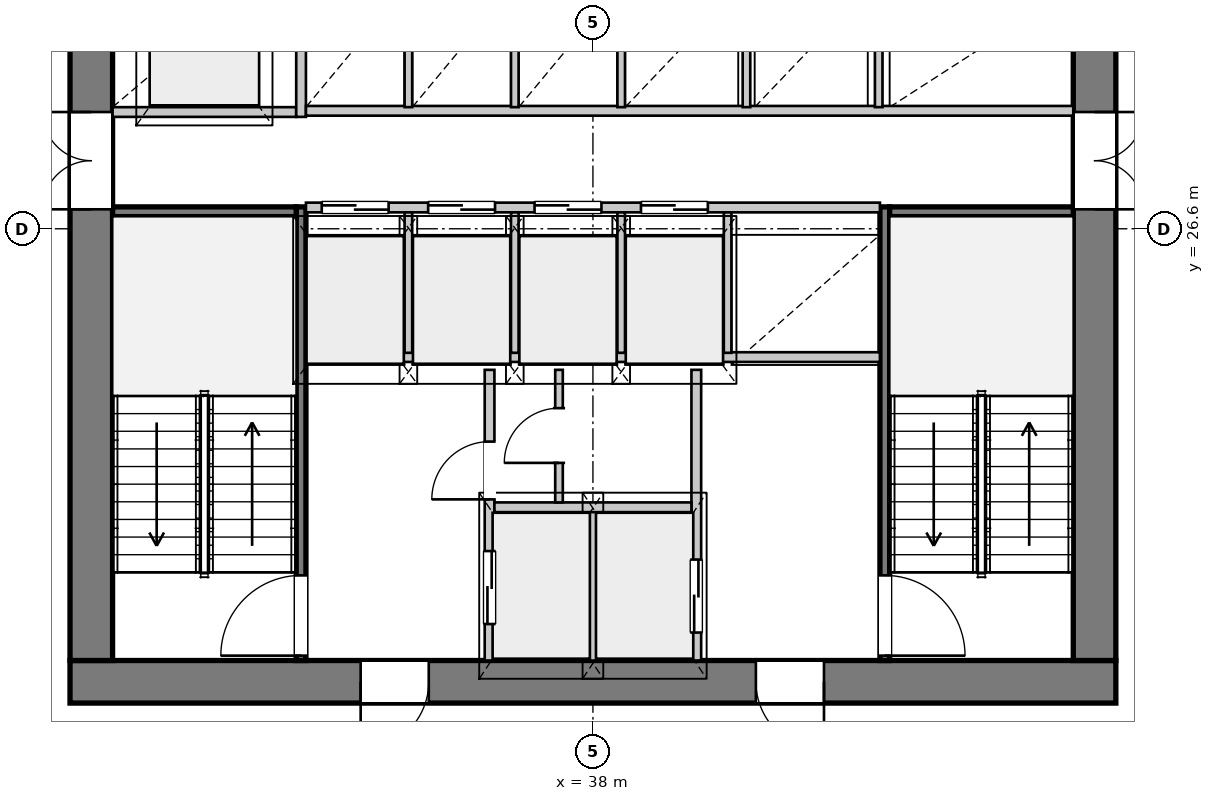
"""IFC4 building model, lengths in metres.
Left out: names, types, materials, properties, quantities, classifications, styles, units other than length and angle.
Written with IfcOpenShell. Run it as: python <this file> out.ifc"""

import sys

from ifc_helpers import new_model, si_unit, direction, frame, frame_2d, origin, place, context, subcontext, project, spatial, rectangle, extrude, source, transform, mapped, element, fill, save


model = new_model("IFC4")
c1 = context("Model", 3, precision=1e-05, world=origin(), true_north=direction((0.0, 1.0)))
c2 = subcontext(c1, "Body", "Model", "MODEL_VIEW")
j1 = project(units=[si_unit("LENGTHUNIT", "METRE"), si_unit("PLANEANGLEUNIT", "RADIAN")], contexts=[c1])
p1 = place(None, origin())
s1 = spatial("IfcSite", under=j1, at=p1, CompositionType="ELEMENT")
p2 = place(p1, origin())
s2 = spatial("IfcBuilding", under=s1, at=p2, CompositionType="ELEMENT")
p3 = place(p2, frame((0.0, 0.0, 119.9)))
s3 = spatial("IfcBuildingStorey", under=s2, at=p3, CompositionType="ELEMENT", Elevation=119.9)
p4 = place(p3, frame((46.6, 19.15, 0.0), z_axis=(0.0, 0.0, 1.0), x_axis=(-1.0, 0.0, 0.0)))
e1 = element("IfcWall", 1, at=p4, inside=s3, PredefinedType="SHEAR", context=c2, shape_type="SweptSolid", body=[
    extrude(rectangle(XDim=17.2, YDim=0.7, at=frame_2d((8.6, 0.0))), origin(), (0.0, 0.0, 1.0), 3.3),
])
p5 = place(p4, frame((4.8, 0.0, 0.0)))
e2 = element("IfcOpeningElement", 2, at=p5, cuts=e1, PredefinedType="OPENING", context=c2, shape_type="SweptSolid", body=[
    extrude(rectangle(XDim=1.12, YDim=2.25, at=frame_2d((0.56, 1.125))), frame((0.0, 0.36, 0.0), z_axis=(0.0, -1.0, 0.0), x_axis=(1.0, 0.0, 0.0)), (0.0, 0.0, 1.0), 0.72),
])
p6 = place(p4, frame((11.3, 0.0, 0.0)))
e3 = element("IfcOpeningElement", 3, at=p6, cuts=e1, PredefinedType="OPENING", context=c2, shape_type="SweptSolid", body=[
    extrude(rectangle(XDim=1.12, YDim=2.25, at=frame_2d((0.56, 1.125))), frame((0.0, 0.36, 0.0), z_axis=(0.0, -1.0, 0.0), x_axis=(1.0, 0.0, 0.0)), (0.0, 0.0, 1.0), 0.72),
])
p7 = place(p3, frame((29.75, 19.5, 0.0), z_axis=(0.0, 0.0, 1.0), x_axis=(0.0, 1.0, 0.0)))
e4 = element("IfcWall", 4, at=p7, inside=s3, PredefinedType="SHEAR", context=c2, shape_type="SweptSolid", body=[
    extrude(rectangle(XDim=14.2, YDim=0.7, at=frame_2d((7.1, 0.0))), origin(), (0.0, 0.0, 1.0), 3.3),
])
p8 = place(p7, frame((7.42, 0.0, 0.0)))
e5 = element("IfcOpeningElement", 5, at=p8, cuts=e4, PredefinedType="OPENING", context=c2, shape_type="SweptSolid", body=[
    extrude(rectangle(XDim=1.6, YDim=2.2, at=frame_2d((0.8, 1.1))), frame((0.0, 0.36, 0.0), z_axis=(0.0, -1.0, 0.0), x_axis=(1.0, 0.0, 0.0)), (0.0, 0.0, 1.0), 0.72),
])
p9 = place(p3, frame((46.25, 33.7, 0.0), z_axis=(0.0, 0.0, 1.0), x_axis=(0.0, -1.0, 0.0)))
e6 = element("IfcWall", 6, at=p9, inside=s3, PredefinedType="SHEAR", context=c2, shape_type="SweptSolid", body=[
    extrude(rectangle(XDim=14.2, YDim=0.7, at=frame_2d((7.1, 0.0))), origin(), (0.0, 0.0, 1.0), 3.3),
])
p10 = place(p9, frame((5.18, 0.0, 0.0)))
e7 = element("IfcOpeningElement", 7, at=p10, cuts=e6, PredefinedType="OPENING", context=c2, shape_type="SweptSolid", body=[
    extrude(rectangle(XDim=1.6, YDim=2.2, at=frame_2d((0.8, 1.1))), frame((0.0, 0.36, 0.0), z_axis=(0.0, -1.0, 0.0), x_axis=(1.0, 0.0, 0.0)), (0.0, 0.0, 1.0), 0.72),
])
p11 = place(p3, frame((33.2, 19.5, 0.0), z_axis=(0.0, 0.0, 1.0), x_axis=(0.0, 1.0, 0.0)))
e8 = element("IfcWall", 8, at=p11, inside=s3, PredefinedType="PARTITIONING", context=c2, shape_type="SweptSolid", body=[
    extrude(rectangle(XDim=7.46, YDim=0.16, at=frame_2d((3.73, 0.0))), origin(), (0.0, 0.0, 1.0), 3.3),
])
p12 = place(p11, frame((0.08, 0.0, 0.0)))
e9 = element("IfcOpeningElement", 9, at=p12, cuts=e8, PredefinedType="OPENING", context=c2, shape_type="SweptSolid", body=[
    extrude(rectangle(XDim=1.32, YDim=2.2, at=frame_2d((0.66, 1.1))), frame((0.0, 0.09, 0.0), z_axis=(0.0, -1.0, 0.0), x_axis=(1.0, 0.0, 0.0)), (0.0, 0.0, 1.0), 0.18),
])
p13 = place(p3, frame((30.1, 26.88, 0.0), z_axis=(0.0, 0.0, 1.0), x_axis=(1.0, 0.0, 0.0)))
e10 = element("IfcWall", 10, at=p13, inside=s3, PredefinedType="PARTITIONING", context=c2, shape_type="SweptSolid", body=[
    extrude(rectangle(XDim=3.02, YDim=0.16, at=frame_2d((1.51, 0.0))), origin(), (0.0, 0.0, 1.0), 3.3),
])
p14 = place(p3, frame((42.8, 26.96, 0.0), z_axis=(0.0, 0.0, 1.0), x_axis=(0.0, -1.0, 0.0)))
e11 = element("IfcWall", 11, at=p14, inside=s3, PredefinedType="PARTITIONING", context=c2, shape_type="SweptSolid", body=[
    extrude(rectangle(XDim=7.46, YDim=0.16, at=frame_2d((3.73, 0.0))), origin(), (0.0, 0.0, 1.0), 3.3),
])
p15 = place(p14, frame((6.06, 0.0, 0.0)))
e12 = element("IfcOpeningElement", 12, at=p15, cuts=e11, PredefinedType="OPENING", context=c2, shape_type="SweptSolid", body=[
    extrude(rectangle(XDim=1.32, YDim=2.2, at=frame_2d((0.66, 1.1))), frame((0.0, 0.09, 0.0), z_axis=(0.0, -1.0, 0.0), x_axis=(1.0, 0.0, 0.0)), (0.0, 0.0, 1.0), 0.18),
])
p16 = place(p3, frame((42.88, 26.88, 0.0), z_axis=(0.0, 0.0, 1.0), x_axis=(1.0, 0.0, 0.0)))
e13 = element("IfcWall", 13, at=p16, inside=s3, PredefinedType="PARTITIONING", context=c2, shape_type="SweptSolid", body=[
    extrude(rectangle(XDim=3.02, YDim=0.16, at=frame_2d((1.51, 0.0))), origin(), (0.0, 0.0, 1.0), 3.3),
])
p17 = place(p3, frame((36.3, 19.5, 0.0), z_axis=(0.0, 0.0, 1.0), x_axis=(0.0, 1.0, 0.0)))
e14 = element("IfcWall", 14, at=p17, inside=s3, PredefinedType="PARTITIONING", context=c2, shape_type="SweptSolid", body=[
    extrude(rectangle(XDim=4.78, YDim=0.16, at=frame_2d((2.39, 0.0))), origin(), (0.0, 0.0, 1.0), 3.3),
])
p18 = place(p17, frame((0.6, 0.0, 0.0)))
e15 = element("IfcOpeningElement", 15, at=p18, cuts=e14, PredefinedType="OPENING", context=c2, shape_type="SweptSolid", body=[
    extrude(rectangle(XDim=1.2, YDim=2.2, at=frame_2d((0.6, 1.1))), frame((0.0, 0.09, 0.0), z_axis=(0.0, -1.0, 0.0), x_axis=(1.0, 0.0, 0.0)), (0.0, 0.0, 1.0), 0.18),
])
p19 = place(p17, frame((2.65, 0.0, 0.0)))
e16 = element("IfcOpeningElement", 16, at=p19, cuts=e14, PredefinedType="OPENING", context=c2, shape_type="SweptSolid", body=[
    extrude(rectangle(XDim=0.95, YDim=2.1, at=frame_2d((0.475, 1.05))), frame((0.0, 0.09, 0.0), z_axis=(0.0, -1.0, 0.0), x_axis=(1.0, 0.0, 0.0)), (0.0, 0.0, 1.0), 0.18),
])
p20 = place(p3, frame((39.7, 24.28, 0.0), z_axis=(0.0, 0.0, 1.0), x_axis=(0.0, -1.0, 0.0)))
e17 = element("IfcWall", 17, at=p20, inside=s3, PredefinedType="PARTITIONING", context=c2, shape_type="SweptSolid", body=[
    extrude(rectangle(XDim=4.78, YDim=0.16, at=frame_2d((2.39, 0.0))), origin(), (0.0, 0.0, 1.0), 3.3),
])
p21 = place(p20, frame((3.12, 0.0, 0.0)))
e18 = element("IfcOpeningElement", 18, at=p21, cuts=e17, PredefinedType="OPENING", context=c2, shape_type="SweptSolid", body=[
    extrude(rectangle(XDim=1.2, YDim=2.2, at=frame_2d((0.6, 1.1))), frame((0.0, 0.09, 0.0), z_axis=(0.0, -1.0, 0.0), x_axis=(1.0, 0.0, 0.0)), (0.0, 0.0, 1.0), 0.18),
])
p22 = place(p3, frame((38.0, 19.5, 0.0), z_axis=(0.0, 0.0, 1.0), x_axis=(0.0, 1.0, 0.0)))
e19 = element("IfcWall", 19, at=p22, inside=s3, PredefinedType="PARTITIONING", context=c2, shape_type="SweptSolid", body=[
    extrude(rectangle(XDim=2.46, YDim=0.125, at=frame_2d((1.23, 0.0))), origin(), (0.0, 0.0, 1.0), 3.3),
])
p23 = place(p3, frame((36.38, 22.02, 0.0), z_axis=(0.0, 0.0, 1.0), x_axis=(1.0, 0.0, 0.0)))
e20 = element("IfcWall", 20, at=p23, inside=s3, PredefinedType="PARTITIONING", context=c2, shape_type="SweptSolid", body=[
    extrude(rectangle(XDim=3.24, YDim=0.16, at=frame_2d((1.62, 0.0))), origin(), (0.0, 0.0, 1.0), 3.3),
])
p24 = place(p3, frame((33.28, 24.49, 0.0), z_axis=(0.0, 0.0, 1.0), x_axis=(1.0, 0.0, 0.0)))
e21 = element("IfcWall", 21, at=p24, inside=s3, PredefinedType="PARTITIONING", context=c2, shape_type="SweptSolid", body=[
    extrude(rectangle(XDim=9.44, YDim=0.16, at=frame_2d((4.72, 0.0))), origin(), (0.0, 0.0, 1.0), 3.3),
])
p25 = place(p3, frame((37.442, 22.1, 0.0), z_axis=(0.0, 0.0, 1.0), x_axis=(0.0, 1.0, 0.0)))
e22 = element("IfcWall", 22, at=p25, inside=s3, PredefinedType="PARTITIONING", context=c2, shape_type="SweptSolid", body=[
    extrude(rectangle(XDim=2.18, YDim=0.125, at=frame_2d((1.09, 0.0))), origin(), (0.0, 0.0, 1.0), 3.3),
])
p26 = place(p25, frame((0.65, 0.0, 0.0)))
e23 = element("IfcOpeningElement", 23, at=p26, cuts=e22, PredefinedType="OPENING", context=c2, shape_type="SweptSolid", body=[
    extrude(rectangle(XDim=0.9, YDim=2.1, at=frame_2d((0.45, 1.05))), frame((0.0, 0.073, 0.0), z_axis=(0.0, -1.0, 0.0), x_axis=(1.0, 0.0, 0.0)), (0.0, 0.0, 1.0), 0.145),
])
p27 = place(p3, frame((30.1, 28.52, 0.0), z_axis=(0.0, 0.0, 1.0), x_axis=(1.0, 0.0, 0.0)))
e24 = element("IfcWall", 24, at=p27, inside=s3, PredefinedType="PARTITIONING", context=c2, shape_type="SweptSolid", body=[
    extrude(rectangle(XDim=3.02, YDim=0.16, at=frame_2d((1.51, 0.0))), origin(), (0.0, 0.0, 1.0), 3.3),
])
p28 = place(p3, frame((33.2, 28.44, 0.0), z_axis=(0.0, 0.0, 1.0), x_axis=(0.0, 1.0, 0.0)))
e25 = element("IfcWall", 25, at=p28, inside=s3, PredefinedType="PARTITIONING", context=c2, shape_type="SweptSolid", body=[
    extrude(rectangle(XDim=5.26, YDim=0.16, at=frame_2d((2.63, 0.0))), origin(), (0.0, 0.0, 1.0), 3.3),
])
p29 = place(p3, frame((33.28, 26.95, 0.0), z_axis=(0.0, 0.0, 1.0), x_axis=(1.0, 0.0, 0.0)))
e26 = element("IfcWall", 26, at=p29, inside=s3, PredefinedType="PARTITIONING", context=c2, shape_type="SweptSolid", body=[
    extrude(rectangle(XDim=9.44, YDim=0.16, at=frame_2d((4.72, 0.0))), origin(), (0.0, 0.0, 1.0), 3.3),
])
p30 = place(p29, frame((0.26, 0.0, 0.0)))
e27 = element("IfcOpeningElement", 27, at=p30, cuts=e26, PredefinedType="OPENING", context=c2, shape_type="SweptSolid", body=[
    extrude(rectangle(XDim=1.1, YDim=2.2, at=frame_2d((0.55, 1.1))), frame((0.0, 0.09, 0.0), z_axis=(0.0, -1.0, 0.0), x_axis=(1.0, 0.0, 0.0)), (0.0, 0.0, 1.0), 0.18),
])
p31 = place(p29, frame((2.01, 0.0, 0.0)))
e28 = element("IfcOpeningElement", 28, at=p31, cuts=e26, PredefinedType="OPENING", context=c2, shape_type="SweptSolid", body=[
    extrude(rectangle(XDim=1.1, YDim=2.2, at=frame_2d((0.55, 1.1))), frame((0.0, 0.09, 0.0), z_axis=(0.0, -1.0, 0.0), x_axis=(1.0, 0.0, 0.0)), (0.0, 0.0, 1.0), 0.18),
])
p32 = place(p29, frame((3.76, 0.0, 0.0)))
e29 = element("IfcOpeningElement", 29, at=p32, cuts=e26, PredefinedType="OPENING", context=c2, shape_type="SweptSolid", body=[
    extrude(rectangle(XDim=1.1, YDim=2.2, at=frame_2d((0.55, 1.1))), frame((0.0, 0.09, 0.0), z_axis=(0.0, -1.0, 0.0), x_axis=(1.0, 0.0, 0.0)), (0.0, 0.0, 1.0), 0.18),
])
p33 = place(p29, frame((5.51, 0.0, 0.0)))
e30 = element("IfcOpeningElement", 30, at=p33, cuts=e26, PredefinedType="OPENING", context=c2, shape_type="SweptSolid", body=[
    extrude(rectangle(XDim=1.1, YDim=2.2, at=frame_2d((0.55, 1.1))), frame((0.0, 0.09, 0.0), z_axis=(0.0, -1.0, 0.0), x_axis=(1.0, 0.0, 0.0)), (0.0, 0.0, 1.0), 0.18),
])
for number, where, z_axis, x_axis in (
    (31, (34.965, 24.56, 0.0), (0.0, 0.0, 1.0), (0.0, 1.0, 0.0)),
    (32, (36.715, 24.56, 0.0), (0.0, 0.0, 1.0), (0.0, 1.0, 0.0)),
    (33, (38.465, 24.56, 0.0), (0.0, 0.0, 1.0), (0.0, 1.0, 0.0)),
    (34, (40.215, 24.56, 0.0), (0.0, 0.0, 1.0), (0.0, 1.0, 0.0)),
):
    element("IfcWall", number, at=place(p3, frame(where, z_axis=z_axis, x_axis=x_axis)), inside=s3, PredefinedType="PARTITIONING", context=c2, shape_type="SweptSolid", body=[
        extrude(rectangle(XDim=2.31, YDim=0.125, at=frame_2d((1.155, 0.0))), origin(), (0.0, 0.0, 1.0), 3.3),
    ])
p34 = place(p3, frame((33.28, 28.54, 0.0), z_axis=(0.0, 0.0, 1.0), x_axis=(1.0, 0.0, 0.0)))
e35 = element("IfcWall", 35, at=p34, inside=s3, PredefinedType="PARTITIONING", context=c2, shape_type="SweptSolid", body=[
    extrude(rectangle(XDim=12.62, YDim=0.16, at=frame_2d((6.31, 0.0))), origin(), (0.0, 0.0, 1.0), 3.3),
])
for number, where, z_axis, x_axis in (
    (36, (34.965, 28.6, 0.0), (0.0, 0.0, 1.0), (0.0, 1.0, 0.0)),
    (37, (36.715, 28.6, 0.0), (0.0, 0.0, 1.0), (0.0, 1.0, 0.0)),
    (38, (38.465, 28.6, 0.0), (0.0, 0.0, 1.0), (0.0, 1.0, 0.0)),
    (39, (40.525, 28.6, 0.0), (0.0, 0.0, 1.0), (0.0, 1.0, 0.0)),
    (40, (42.7, 28.6, 0.0), (0.0, 0.0, 1.0), (0.0, 1.0, 0.0)),
):
    element("IfcWall", number, at=place(p3, frame(where, z_axis=z_axis, x_axis=x_axis)), inside=s3, PredefinedType="PARTITIONING", context=c2, shape_type="SweptSolid", body=[
        extrude(rectangle(XDim=1.92, YDim=0.125, at=frame_2d((0.96, 0.0))), origin(), (0.0, 0.0, 1.0), 3.3),
    ])
m1 = source(origin(), c2, "Body", "SweptSolid", [
    extrude(rectangle(XDim=1.12, YDim=2.25, at=frame_2d((0.56, 1.125))), frame((0.0, 0.025, 0.0), z_axis=(0.0, -1.0, 0.0), x_axis=(1.0, 0.0, 0.0)), (0.0, 0.0, 1.0), 0.05),
])
p35 = place(p5, origin())
e41 = element("IfcDoor", 41, at=p35, inside=s3, OperationType="SINGLE_SWING_LEFT", PredefinedType="DOOR", context=c2, shape_type="MappedRepresentation", body=[
    mapped(m1, transform((0.0, 0.0, 0.0), x_axis=(1.0, 0.0, 0.0), y_axis=(0.0, 1.0, 0.0), z_axis=(0.0, 0.0, 1.0), scale=1.0)),
])
fill(e2, e41)
p36 = place(p6, origin())
e42 = element("IfcDoor", 42, at=p36, inside=s3, OperationType="SINGLE_SWING_RIGHT", PredefinedType="DOOR", context=c2, shape_type="MappedRepresentation", body=[
    mapped(m1, transform((0.0, 0.0, 0.0), x_axis=(1.0, 0.0, 0.0), y_axis=(0.0, 1.0, 0.0), z_axis=(0.0, 0.0, 1.0), scale=1.0)),
])
fill(e3, e42)
m2 = source(origin(), c2, "Body", "SweptSolid", [
    extrude(rectangle(XDim=1.6, YDim=2.2, at=frame_2d((0.8, 1.1))), frame((0.0, 0.025, 0.0), z_axis=(0.0, -1.0, 0.0), x_axis=(1.0, 0.0, 0.0)), (0.0, 0.0, 1.0), 0.05),
])
p37 = place(p8, origin())
e43 = element("IfcDoor", 43, at=p37, inside=s3, OperationType="DOUBLE_DOOR_SINGLE_SWING", PredefinedType="DOOR", context=c2, shape_type="MappedRepresentation", body=[
    mapped(m2, transform((0.0, 0.0, 0.0), x_axis=(1.0, 0.0, 0.0), y_axis=(0.0, 1.0, 0.0), z_axis=(0.0, 0.0, 1.0), scale=1.0)),
])
fill(e5, e43)
p38 = place(p10, origin())
e44 = element("IfcDoor", 44, at=p38, inside=s3, OperationType="DOUBLE_DOOR_SINGLE_SWING", PredefinedType="DOOR", context=c2, shape_type="MappedRepresentation", body=[
    mapped(m2, transform((0.0, 0.0, 0.0), x_axis=(1.0, 0.0, 0.0), y_axis=(0.0, 1.0, 0.0), z_axis=(0.0, 0.0, 1.0), scale=1.0)),
])
fill(e7, e44)
m3 = source(origin(), c2, "Body", "SweptSolid", [
    extrude(rectangle(XDim=1.32, YDim=2.2, at=frame_2d((0.66, 1.1))), frame((0.0, 0.025, 0.0), z_axis=(0.0, -1.0, 0.0), x_axis=(1.0, 0.0, 0.0)), (0.0, 0.0, 1.0), 0.05),
])
p39 = place(p12, origin())
e45 = element("IfcDoor", 45, at=p39, inside=s3, OperationType="SINGLE_SWING_LEFT", PredefinedType="DOOR", context=c2, shape_type="MappedRepresentation", body=[
    mapped(m3, transform((0.0, 0.0, 0.0), x_axis=(1.0, 0.0, 0.0), y_axis=(0.0, 1.0, 0.0), z_axis=(0.0, 0.0, 1.0), scale=1.0)),
])
fill(e9, e45)
p40 = place(p15, origin())
e46 = element("IfcDoor", 46, at=p40, inside=s3, OperationType="SINGLE_SWING_RIGHT", PredefinedType="DOOR", context=c2, shape_type="MappedRepresentation", body=[
    mapped(m3, transform((0.0, 0.0, 0.0), x_axis=(1.0, 0.0, 0.0), y_axis=(0.0, 1.0, 0.0), z_axis=(0.0, 0.0, 1.0), scale=1.0)),
])
fill(e12, e46)
m4 = source(origin(), c2, "Body", "SweptSolid", [
    extrude(rectangle(XDim=1.2, YDim=2.2, at=frame_2d((0.6, 1.1))), frame((0.0, 0.025, 0.0), z_axis=(0.0, -1.0, 0.0), x_axis=(1.0, 0.0, 0.0)), (0.0, 0.0, 1.0), 0.05),
])
p41 = place(p18, origin())
e47 = element("IfcDoor", 47, at=p41, inside=s3, OperationType="DOUBLE_DOOR_SLIDING", PredefinedType="DOOR", context=c2, shape_type="MappedRepresentation", body=[
    mapped(m4, transform((0.0, 0.0, 0.0), x_axis=(1.0, 0.0, 0.0), y_axis=(0.0, 1.0, 0.0), z_axis=(0.0, 0.0, 1.0), scale=1.0)),
])
fill(e15, e47)
m5 = source(origin(), c2, "Body", "SweptSolid", [
    extrude(rectangle(XDim=0.95, YDim=2.1, at=frame_2d((0.475, 1.05))), frame((0.0, 0.025, 0.0), z_axis=(0.0, -1.0, 0.0), x_axis=(1.0, 0.0, 0.0)), (0.0, 0.0, 1.0), 0.05),
])
p42 = place(p19, origin())
e48 = element("IfcDoor", 48, at=p42, inside=s3, OperationType="SINGLE_SWING_LEFT", PredefinedType="DOOR", context=c2, shape_type="MappedRepresentation", body=[
    mapped(m5, transform((0.0, 0.0, 0.0), x_axis=(1.0, 0.0, 0.0), y_axis=(0.0, 1.0, 0.0), z_axis=(0.0, 0.0, 1.0), scale=1.0)),
])
fill(e16, e48)
m6 = source(origin(), c2, "Body", "SweptSolid", [
    extrude(rectangle(XDim=0.9, YDim=2.1, at=frame_2d((0.45, 1.05))), frame((0.0, 0.025, 0.0), z_axis=(0.0, -1.0, 0.0), x_axis=(1.0, 0.0, 0.0)), (0.0, 0.0, 1.0), 0.05),
])
p43 = place(p26, origin())
e49 = element("IfcDoor", 49, at=p43, inside=s3, OperationType="SINGLE_SWING_LEFT", PredefinedType="DOOR", context=c2, shape_type="MappedRepresentation", body=[
    mapped(m6, transform((0.0, 0.0, 0.0), x_axis=(1.0, 0.0, 0.0), y_axis=(0.0, 1.0, 0.0), z_axis=(0.0, 0.0, 1.0), scale=1.0)),
])
fill(e23, e49)
p44 = place(p21, origin())
e50 = element("IfcDoor", 50, at=p44, inside=s3, OperationType="DOUBLE_DOOR_SLIDING", PredefinedType="DOOR", context=c2, shape_type="MappedRepresentation", body=[
    mapped(m4, transform((0.0, 0.0, 0.0), x_axis=(1.0, 0.0, 0.0), y_axis=(0.0, 1.0, 0.0), z_axis=(0.0, 0.0, 1.0), scale=1.0)),
])
fill(e18, e50)
m7 = source(origin(), c2, "Body", "SweptSolid", [
    extrude(rectangle(XDim=1.1, YDim=2.2, at=frame_2d((0.55, 1.1))), frame((0.0, 0.025, 0.0), z_axis=(0.0, -1.0, 0.0), x_axis=(1.0, 0.0, 0.0)), (0.0, 0.0, 1.0), 0.05),
])
p45 = place(p30, origin())
e51 = element("IfcDoor", 51, at=p45, inside=s3, OperationType="DOUBLE_DOOR_SLIDING", PredefinedType="DOOR", context=c2, shape_type="MappedRepresentation", body=[
    mapped(m7, transform((0.0, 0.0, 0.0), x_axis=(1.0, 0.0, 0.0), y_axis=(0.0, 1.0, 0.0), z_axis=(0.0, 0.0, 1.0), scale=1.0)),
])
fill(e27, e51)
p46 = place(p31, origin())
e52 = element("IfcDoor", 52, at=p46, inside=s3, OperationType="DOUBLE_DOOR_SLIDING", PredefinedType="DOOR", context=c2, shape_type="MappedRepresentation", body=[
    mapped(m7, transform((0.0, 0.0, 0.0), x_axis=(1.0, 0.0, 0.0), y_axis=(0.0, 1.0, 0.0), z_axis=(0.0, 0.0, 1.0), scale=1.0)),
])
fill(e28, e52)
p47 = place(p32, origin())
e53 = element("IfcDoor", 53, at=p47, inside=s3, OperationType="DOUBLE_DOOR_SLIDING", PredefinedType="DOOR", context=c2, shape_type="MappedRepresentation", body=[
    mapped(m7, transform((0.0, 0.0, 0.0), x_axis=(1.0, 0.0, 0.0), y_axis=(0.0, 1.0, 0.0), z_axis=(0.0, 0.0, 1.0), scale=1.0)),
])
fill(e29, e53)
p48 = place(p33, origin())
e54 = element("IfcDoor", 54, at=p48, inside=s3, OperationType="DOUBLE_DOOR_SLIDING", PredefinedType="DOOR", context=c2, shape_type="MappedRepresentation", body=[
    mapped(m7, transform((0.0, 0.0, 0.0), x_axis=(1.0, 0.0, 0.0), y_axis=(0.0, 1.0, 0.0), z_axis=(0.0, 0.0, 1.0), scale=1.0)),
])
fill(e30, e54)
save(model, sys.argv[1])
